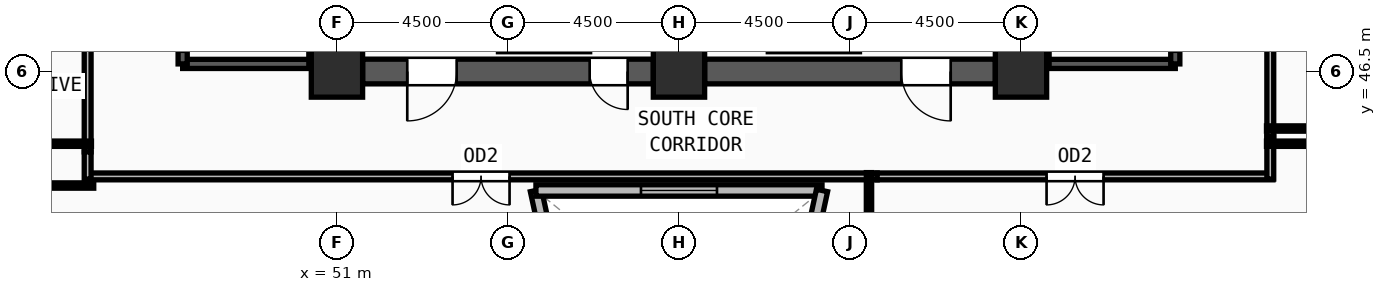
"""IFC4 building model, lengths in metres.
Left out: names, types, materials, properties, quantities, classifications, styles, units other than length and angle.
Written with IfcOpenShell. Run it as: python <this file> out.ifc"""

import sys

from ifc_helpers import new_model, si_unit, direction, frame, frame_2d, origin, origin_2d, place, context, subcontext, project, spatial, rectangle, extrude, source, transform, mapped, element, fill, save


model = new_model("IFC4")
c1 = context("Model", 3, precision=1e-05, world=origin(), true_north=direction((0.0, 1.0)))
c2 = subcontext(c1, "Body", "Model", "MODEL_VIEW")
j1 = project(units=[si_unit("LENGTHUNIT", "METRE"), si_unit("PLANEANGLEUNIT", "RADIAN")], contexts=[c1])
p1 = place(None, origin())
s1 = spatial("IfcSite", under=j1, at=p1, CompositionType="ELEMENT")
p2 = place(p1, origin())
s2 = spatial("IfcBuilding", under=s1, at=p2, CompositionType="ELEMENT")
p3 = place(p2, frame((0.0, 0.0, 224.25)))
s3 = spatial("IfcBuildingStorey", under=s2, at=p3, CompositionType="ELEMENT", Elevation=224.25)
m1 = source(origin(), c2, "Body", "SweptSolid", [
    extrude(rectangle(XDim=1.35, YDim=1.35, at=origin_2d()), origin(), (0.0, 0.0, 1.0), 3.75),
])
for number, where, z_axis, x_axis in (
    (1, (51.0, 46.5, 0.0), (0.0, 0.0, 1.0), (1.0, 0.0, 0.0)),
    (2, (60.0, 46.5, 0.0), (0.0, 0.0, 1.0), (1.0, 0.0, 0.0)),
    (3, (69.0, 46.5, 0.0), (0.0, 0.0, 1.0), (1.0, 0.0, 0.0)),
):
    element("IfcColumn", number, at=place(p3, frame(where, z_axis=z_axis, x_axis=x_axis)), inside=s3, PredefinedType="COLUMN", context=c2, shape_type="MappedRepresentation", body=[
        mapped(m1, transform((0.0, 0.0, 0.0), x_axis=(1.0, 0.0, 0.0), y_axis=(0.0, 1.0, 0.0), z_axis=(0.0, 0.0, 1.0), scale=1.0)),
    ])
p4 = place(p3, frame((38.205, 43.643, 0.0), z_axis=(0.0, 0.0, 1.0), x_axis=(0.553179293126, -0.83306222436, 0.0)))
e4 = element("IfcWall", 4, at=p4, inside=s3, PredefinedType="SOLIDWALL", context=c2, shape_type="SweptSolid", body=[
    extrude(rectangle(XDim=29.023, YDim=0.38, at=frame_2d((14.511, 0.0))), origin(), (0.0, 0.0, 1.0), 3.57),
])
m2 = source(origin(), c2, "Body", "SweptSolid", [
    extrude(rectangle(XDim=1.5, YDim=1.9, at=frame_2d((0.75, 0.95))), frame((0.0, 0.2, 0.0), z_axis=(0.0, -1.0, 0.0), x_axis=(1.0, 0.0, 0.0)), (0.0, 0.0, 1.0), 0.4),
])
p5 = place(p4, frame((6.506, 0.0, 0.55)))
e5 = element("IfcOpeningElement", 5, at=p5, cuts=e4, PredefinedType="OPENING", context=c2, shape_type="MappedRepresentation", body=[
    mapped(m2, transform((0.0, 0.0, 0.0), x_axis=(1.0, 0.0, 0.0), y_axis=(0.0, 1.0, 0.0), z_axis=(0.0, 0.0, 1.0), scale=1.0)),
])
p6 = place(p4, frame((13.762, 0.0, 0.55)))
e6 = element("IfcOpeningElement", 6, at=p6, cuts=e4, PredefinedType="OPENING", context=c2, shape_type="MappedRepresentation", body=[
    mapped(m2, transform((0.0, 0.0, 0.0), x_axis=(1.0, 0.0, 0.0), y_axis=(0.0, 1.0, 0.0), z_axis=(0.0, 0.0, 1.0), scale=1.0)),
])
p7 = place(p4, frame((21.017, 0.0, 0.55)))
e7 = element("IfcOpeningElement", 7, at=p7, cuts=e4, PredefinedType="OPENING", context=c2, shape_type="MappedRepresentation", body=[
    mapped(m2, transform((0.0, 0.0, 0.0), x_axis=(1.0, 0.0, 0.0), y_axis=(0.0, 1.0, 0.0), z_axis=(0.0, 0.0, 1.0), scale=1.0)),
])
p8 = place(p3, frame((68.325, 46.5, 0.0), z_axis=(0.0, 0.0, 1.0), x_axis=(-1.0, 0.0, 0.0)))
e8 = element("IfcWall", 8, at=p8, inside=s3, PredefinedType="SHEAR", context=c2, shape_type="SweptSolid", body=[
    extrude(rectangle(XDim=7.65, YDim=0.65, at=frame_2d((3.825, 0.0))), origin(), (0.0, 0.0, 1.0), 3.57),
])
m3 = source(origin(), c2, "Body", "SweptSolid", [
    extrude(rectangle(XDim=1.3, YDim=2.2, at=frame_2d((0.65, 1.1))), frame((0.0, 0.335, 0.0), z_axis=(0.0, -1.0, 0.0), x_axis=(1.0, 0.0, 0.0)), (0.0, 0.0, 1.0), 0.67),
])
p9 = place(p8, frame((1.175, 0.0, 0.0)))
e9 = element("IfcOpeningElement", 9, at=p9, cuts=e8, PredefinedType="OPENING", context=c2, shape_type="MappedRepresentation", body=[
    mapped(m3, transform((0.0, 0.0, 0.0), x_axis=(1.0, 0.0, 0.0), y_axis=(0.0, 1.0, 0.0), z_axis=(0.0, 0.0, 1.0), scale=1.0)),
])
p10 = place(p3, frame((59.325, 46.5, 0.0), z_axis=(0.0, 0.0, 1.0), x_axis=(-1.0, 0.0, 0.0)))
e10 = element("IfcWall", 10, at=p10, inside=s3, PredefinedType="SHEAR", context=c2, shape_type="SweptSolid", body=[
    extrude(rectangle(XDim=7.65, YDim=0.65, at=frame_2d((3.825, 0.0))), origin(), (0.0, 0.0, 1.0), 3.57),
])
p11 = place(p10, frame((5.175, 0.0, 0.0)))
e11 = element("IfcOpeningElement", 11, at=p11, cuts=e10, PredefinedType="OPENING", context=c2, shape_type="MappedRepresentation", body=[
    mapped(m3, transform((0.0, 0.0, 0.0), x_axis=(1.0, 0.0, 0.0), y_axis=(0.0, 1.0, 0.0), z_axis=(0.0, 0.0, 1.0), scale=1.0)),
])
m4 = source(origin(), c2, "Body", "SweptSolid", [
    extrude(rectangle(XDim=1.0, YDim=2.2, at=frame_2d((0.5, 1.1))), frame((0.0, 0.335, 0.0), z_axis=(0.0, -1.0, 0.0), x_axis=(1.0, 0.0, 0.0)), (0.0, 0.0, 1.0), 0.67),
])
p12 = place(p10, frame((0.675, 0.0, 0.0)))
e12 = element("IfcOpeningElement", 12, at=p12, cuts=e10, PredefinedType="OPENING", context=c2, shape_type="MappedRepresentation", body=[
    mapped(m4, transform((0.0, 0.0, 0.0), x_axis=(1.0, 0.0, 0.0), y_axis=(0.0, 1.0, 0.0), z_axis=(0.0, 0.0, 1.0), scale=1.0)),
])
p13 = place(p3, frame((46.94, 46.7, 0.0), z_axis=(0.0, 0.0, 1.0), x_axis=(1.0, 0.0, 0.0)))
e13 = element("IfcWall", 13, at=p13, inside=s3, PredefinedType="SOLIDWALL", context=c2, shape_type="SweptSolid", body=[
    extrude(rectangle(XDim=3.44, YDim=0.24, at=frame_2d((1.72, 0.0))), origin(), (0.0, 0.0, 1.0), 3.57),
])
p14 = place(p3, frame((50.38, 46.7, 0.0), z_axis=(0.0, 0.0, 1.0), x_axis=(0.0, 1.0, 0.0)))
e14 = element("IfcWall", 14, at=p14, inside=s3, PredefinedType="SOLIDWALL", context=c2, shape_type="SweptSolid", body=[
    extrude(rectangle(XDim=7.82, YDim=0.24, at=frame_2d((3.91, 0.0))), origin(), (0.0, 0.0, 1.0), 3.57),
])
p15 = place(p3, frame((46.94, 54.52, 0.0), z_axis=(0.0, 0.0, 1.0), x_axis=(0.0, -1.0, 0.0)))
e15 = element("IfcWall", 15, at=p15, inside=s3, PredefinedType="SOLIDWALL", context=c2, shape_type="SweptSolid", body=[
    extrude(rectangle(XDim=7.82, YDim=0.24, at=frame_2d((3.91, 0.0))), origin(), (0.0, 0.0, 1.0), 3.57),
])
m5 = source(origin(), c2, "Body", "SweptSolid", [
    extrude(rectangle(XDim=1.2, YDim=2.2, at=frame_2d((0.6, 1.1))), frame((0.0, 0.13, 0.0), z_axis=(0.0, -1.0, 0.0), x_axis=(1.0, 0.0, 0.0)), (0.0, 0.0, 1.0), 0.26),
])
p16 = place(p15, frame((6.3, 0.0, 0.0)))
e16 = element("IfcOpeningElement", 16, at=p16, cuts=e15, PredefinedType="OPENING", context=c2, shape_type="MappedRepresentation", body=[
    mapped(m5, transform((0.0, 0.0, 0.0), x_axis=(1.0, 0.0, 0.0), y_axis=(0.0, 1.0, 0.0), z_axis=(0.0, 0.0, 1.0), scale=1.0)),
])
p17 = place(p3, frame((69.62, 46.7, 0.0), z_axis=(0.0, 0.0, 1.0), x_axis=(1.0, 0.0, 0.0)))
e17 = element("IfcWall", 17, at=p17, inside=s3, PredefinedType="SOLIDWALL", context=c2, shape_type="SweptSolid", body=[
    extrude(rectangle(XDim=3.44, YDim=0.24, at=frame_2d((1.72, 0.0))), origin(), (0.0, 0.0, 1.0), 3.57),
])
p18 = place(p3, frame((73.06, 46.7, 0.0), z_axis=(0.0, 0.0, 1.0), x_axis=(0.0, 1.0, 0.0)))
e18 = element("IfcWall", 18, at=p18, inside=s3, PredefinedType="SOLIDWALL", context=c2, shape_type="SweptSolid", body=[
    extrude(rectangle(XDim=7.82, YDim=0.24, at=frame_2d((3.91, 0.0))), origin(), (0.0, 0.0, 1.0), 3.57),
])
p19 = place(p18, frame((0.32, 0.0, 0.0)))
e19 = element("IfcOpeningElement", 19, at=p19, cuts=e18, PredefinedType="OPENING", context=c2, shape_type="MappedRepresentation", body=[
    mapped(m5, transform((0.0, 0.0, 0.0), x_axis=(1.0, 0.0, 0.0), y_axis=(0.0, 1.0, 0.0), z_axis=(0.0, 0.0, 1.0), scale=1.0)),
])
p20 = place(p3, frame((69.62, 54.52, 0.0), z_axis=(0.0, 0.0, 1.0), x_axis=(0.0, -1.0, 0.0)))
e20 = element("IfcWall", 20, at=p20, inside=s3, PredefinedType="SOLIDWALL", context=c2, shape_type="SweptSolid", body=[
    extrude(rectangle(XDim=7.82, YDim=0.24, at=frame_2d((3.91, 0.0))), origin(), (0.0, 0.0, 1.0), 3.57),
])
p21 = place(p3, frame((57.554, 37.277, 0.0), z_axis=(0.0, 0.0, 1.0), x_axis=(-0.211403575635, 0.977398858301, 0.0)))
e21 = element("IfcWall", 21, at=p21, inside=s3, PredefinedType="SOLIDWALL", context=c2, shape_type="SweptSolid", body=[
    extrude(rectangle(XDim=6.234, YDim=0.3, at=frame_2d((3.117, 0.0))), origin(), (0.0, 0.0, 1.0), 3.57),
])
m6 = source(origin(), c2, "Body", "SweptSolid", [
    extrude(rectangle(XDim=2.0, YDim=1.9, at=frame_2d((1.0, 0.95))), frame((0.0, 0.16, 0.0), z_axis=(0.0, -1.0, 0.0), x_axis=(1.0, 0.0, 0.0)), (0.0, 0.0, 1.0), 0.32),
])
p22 = place(p21, frame((2.117, 0.0, 0.55)))
e22 = element("IfcOpeningElement", 22, at=p22, cuts=e21, PredefinedType="OPENING", context=c2, shape_type="MappedRepresentation", body=[
    mapped(m6, transform((0.0, 0.0, 0.0), x_axis=(1.0, 0.0, 0.0), y_axis=(0.0, 1.0, 0.0), z_axis=(0.0, 0.0, 1.0), scale=1.0)),
])
p23 = place(p3, frame((56.236, 43.37, 0.0), z_axis=(0.0, 0.0, 1.0), x_axis=(1.0, 0.0, 0.0)))
e23 = element("IfcWall", 23, at=p23, inside=s3, PredefinedType="SOLIDWALL", context=c2, shape_type="SweptSolid", body=[
    extrude(rectangle(XDim=7.528, YDim=0.3, at=frame_2d((3.764, 0.0))), origin(), (0.0, 0.0, 1.0), 3.57),
])
p24 = place(p23, frame((2.764, 0.0, 0.55)))
e24 = element("IfcOpeningElement", 24, at=p24, cuts=e23, PredefinedType="OPENING", context=c2, shape_type="MappedRepresentation", body=[
    mapped(m6, transform((0.0, 0.0, 0.0), x_axis=(1.0, 0.0, 0.0), y_axis=(0.0, 1.0, 0.0), z_axis=(0.0, 0.0, 1.0), scale=1.0)),
])
p25 = place(p3, frame((63.764, 43.37, 0.0), z_axis=(0.0, 0.0, 1.0), x_axis=(-0.211403575635, -0.977398858301, 0.0)))
e25 = element("IfcWall", 25, at=p25, inside=s3, PredefinedType="SOLIDWALL", context=c2, shape_type="SweptSolid", body=[
    extrude(rectangle(XDim=6.234, YDim=0.3, at=frame_2d((3.117, 0.0))), origin(), (0.0, 0.0, 1.0), 3.57),
])
p26 = place(p25, frame((2.117, 0.0, 0.55)))
e26 = element("IfcOpeningElement", 26, at=p26, cuts=e25, PredefinedType="OPENING", context=c2, shape_type="MappedRepresentation", body=[
    mapped(m6, transform((0.0, 0.0, 0.0), x_axis=(1.0, 0.0, 0.0), y_axis=(0.0, 1.0, 0.0), z_axis=(0.0, 0.0, 1.0), scale=1.0)),
])
p27 = place(p3, frame((65.215, 43.74, 0.0), z_axis=(0.0, 0.0, 1.0), x_axis=(-1.0, 0.0, 0.0)))
e27 = element("IfcWall", 27, at=p27, inside=s3, PredefinedType="PARTITIONING", context=c2, shape_type="SweptSolid", body=[
    extrude(rectangle(XDim=20.845, YDim=0.18, at=frame_2d((10.422, 0.0))), origin(), (0.0, 0.0, 1.0), 3.57),
])
m7 = source(origin(), c2, "Body", "SweptSolid", [
    extrude(rectangle(XDim=1.5, YDim=2.2, at=frame_2d((0.75, 1.1))), frame((0.0, 0.1, 0.0), z_axis=(0.0, -1.0, 0.0), x_axis=(1.0, 0.0, 0.0)), (0.0, 0.0, 1.0), 0.2),
])
p28 = place(p27, frame((9.673, 0.0, 0.0)))
e28 = element("IfcOpeningElement", 28, at=p28, cuts=e27, PredefinedType="OPENING", context=c2, shape_type="MappedRepresentation", body=[
    mapped(m7, transform((0.0, 0.0, 0.0), x_axis=(1.0, 0.0, 0.0), y_axis=(0.0, 1.0, 0.0), z_axis=(0.0, 0.0, 1.0), scale=1.0)),
])
p29 = place(p3, frame((75.63, 43.74, 0.0), z_axis=(0.0, 0.0, 1.0), x_axis=(-1.0, 0.0, 0.0)))
e29 = element("IfcWall", 29, at=p29, inside=s3, PredefinedType="PARTITIONING", context=c2, shape_type="SweptSolid", body=[
    extrude(rectangle(XDim=10.415, YDim=0.18, at=frame_2d((5.208, 0.0))), origin(), (0.0, 0.0, 1.0), 3.57),
])
p30 = place(p29, frame((4.457, 0.0, 0.0)))
e30 = element("IfcOpeningElement", 30, at=p30, cuts=e29, PredefinedType="OPENING", context=c2, shape_type="MappedRepresentation", body=[
    mapped(m7, transform((0.0, 0.0, 0.0), x_axis=(1.0, 0.0, 0.0), y_axis=(0.0, 1.0, 0.0), z_axis=(0.0, 0.0, 1.0), scale=1.0)),
])
p31 = place(p3, frame((75.56, 51.285, 0.0), z_axis=(0.0, 0.0, 1.0), x_axis=(0.0, -1.0, 0.0)))
e31 = element("IfcWall", 31, at=p31, inside=s3, PredefinedType="PARTITIONING", context=c2, shape_type="SweptSolid", body=[
    extrude(rectangle(XDim=6.5, YDim=0.18, at=frame_2d((3.25, 0.0))), origin(), (0.0, 0.0, 1.0), 3.57),
])
m8 = source(origin(), c2, "Body", "SweptSolid", [
    extrude(rectangle(XDim=1.0, YDim=2.2, at=frame_2d((0.5, 1.1))), frame((0.0, 0.1, 0.0), z_axis=(0.0, -1.0, 0.0), x_axis=(1.0, 0.0, 0.0)), (0.0, 0.0, 1.0), 0.2),
])
p32 = place(p31, frame((2.75, 0.0, 0.0)))
e32 = element("IfcOpeningElement", 32, at=p32, cuts=e31, PredefinedType="OPENING", context=c2, shape_type="MappedRepresentation", body=[
    mapped(m8, transform((0.0, 0.0, 0.0), x_axis=(1.0, 0.0, 0.0), y_axis=(0.0, 1.0, 0.0), z_axis=(0.0, 0.0, 1.0), scale=1.0)),
])
p33 = place(p3, frame((44.44, 44.385, 0.0), z_axis=(0.0, 0.0, 1.0), x_axis=(0.0, 1.0, 0.0)))
e33 = element("IfcWall", 33, at=p33, inside=s3, PredefinedType="PARTITIONING", context=c2, shape_type="SweptSolid", body=[
    extrude(rectangle(XDim=3.825, YDim=0.18, at=frame_2d((1.913, 0.0))), origin(), (0.0, 0.0, 1.0), 3.57),
])
p34 = place(p3, frame((44.44, 43.67, 0.0), z_axis=(0.0, 0.0, 1.0), x_axis=(0.0, 1.0, 0.0)))
e34 = element("IfcWall", 34, at=p34, inside=s3, PredefinedType="PARTITIONING", context=c2, shape_type="SweptSolid", body=[
    extrude(rectangle(XDim=0.715, YDim=0.18, at=frame_2d((0.357, 0.0))), origin(), (0.0, 0.0, 1.0), 3.57),
])
p35 = place(p3, frame((75.56, 44.785, 0.0), z_axis=(0.0, 0.0, 1.0), x_axis=(0.0, -1.0, 0.0)))
e35 = element("IfcWall", 35, at=p35, inside=s3, PredefinedType="PARTITIONING", context=c2, shape_type="SweptSolid", body=[
    extrude(rectangle(XDim=1.115, YDim=0.18, at=frame_2d((0.558, 0.0))), origin(), (0.0, 0.0, 1.0), 3.57),
])
p36 = place(p3, frame((44.6, 43.5, 0.0), z_axis=(0.0, 0.0, 1.0), x_axis=(-1.0, 0.0, 0.0)))
e36 = element("IfcWall", 36, at=p36, inside=s3, PredefinedType="PARTITIONING", context=c2, shape_type="SweptSolid", body=[
    extrude(rectangle(XDim=7.056, YDim=0.14, at=frame_2d((3.528, 0.0))), origin(), (0.0, 0.0, 1.0), 3.57),
])
p37 = place(p3, frame((44.54, 44.6, 0.0), z_axis=(0.0, 0.0, 1.0), x_axis=(-1.0, 0.0, 0.0)))
e37 = element("IfcWall", 37, at=p37, inside=s3, PredefinedType="PARTITIONING", context=c2, shape_type="SweptSolid", body=[
    extrude(rectangle(XDim=7.588, YDim=0.14, at=frame_2d((3.794, 0.0))), origin(), (0.0, 0.0, 1.0), 3.57),
])
p38 = place(p3, frame((75.46, 44.6, 0.0), z_axis=(0.0, 0.0, 1.0), x_axis=(1.0, 0.0, 0.0)))
e38 = element("IfcWall", 38, at=p38, inside=s3, PredefinedType="PARTITIONING", context=c2, shape_type="SweptSolid", body=[
    extrude(rectangle(XDim=7.244, YDim=0.14, at=frame_2d((3.622, 0.0))), origin(), (0.0, 0.0, 1.0), 3.57),
])
p39 = place(p3, frame((75.46, 45.0, 0.0), z_axis=(0.0, 0.0, 1.0), x_axis=(1.0, 0.0, 0.0)))
e39 = element("IfcWall", 39, at=p39, inside=s3, PredefinedType="PARTITIONING", context=c2, shape_type="SweptSolid", body=[
    extrude(rectangle(XDim=7.442, YDim=0.14, at=frame_2d((3.721, 0.0))), origin(), (0.0, 0.0, 1.0), 3.57),
])
p40 = place(p3, frame((65.0, 43.84, 0.0), z_axis=(0.0, 0.0, 1.0), x_axis=(0.0, -1.0, 0.0)))
e40 = element("IfcWall", 40, at=p40, inside=s3, PredefinedType="PARTITIONING", context=c2, shape_type="SweptSolid", body=[
    extrude(rectangle(XDim=25.438, YDim=0.14, at=frame_2d((12.719, 0.0))), origin(), (0.0, 0.0, 1.0), 3.57),
])
m9 = source(origin(), c2, "Body", "SweptSolid", [
    extrude(rectangle(XDim=1.3, YDim=2.2, at=frame_2d((0.65, 1.1))), frame((0.0, 0.025, 0.0), z_axis=(0.0, -1.0, 0.0), x_axis=(1.0, 0.0, 0.0)), (0.0, 0.0, 1.0), 0.05),
])
p41 = place(p11, origin())
e41 = element("IfcDoor", 41, at=p41, inside=s3, OperationType="SINGLE_SWING_RIGHT", PredefinedType="DOOR", context=c2, shape_type="MappedRepresentation", body=[
    mapped(m9, transform((0.0, 0.0, 0.0), x_axis=(1.0, 0.0, 0.0), y_axis=(0.0, 1.0, 0.0), z_axis=(0.0, 0.0, 1.0), scale=1.0)),
])
fill(e11, e41)
m10 = source(origin(), c2, "Body", "SweptSolid", [
    extrude(rectangle(XDim=1.0, YDim=2.2, at=frame_2d((0.5, 1.1))), frame((0.0, 0.025, 0.0), z_axis=(0.0, -1.0, 0.0), x_axis=(1.0, 0.0, 0.0)), (0.0, 0.0, 1.0), 0.05),
])
p42 = place(p12, origin())
e42 = element("IfcDoor", 42, at=p42, inside=s3, OperationType="SINGLE_SWING_LEFT", PredefinedType="DOOR", context=c2, shape_type="MappedRepresentation", body=[
    mapped(m10, transform((0.0, 0.0, 0.0), x_axis=(1.0, 0.0, 0.0), y_axis=(0.0, 1.0, 0.0), z_axis=(0.0, 0.0, 1.0), scale=1.0)),
])
fill(e12, e42)
p43 = place(p9, origin())
e43 = element("IfcDoor", 43, at=p43, inside=s3, OperationType="SINGLE_SWING_LEFT", PredefinedType="DOOR", context=c2, shape_type="MappedRepresentation", body=[
    mapped(m9, transform((0.0, 0.0, 0.0), x_axis=(1.0, 0.0, 0.0), y_axis=(0.0, 1.0, 0.0), z_axis=(0.0, 0.0, 1.0), scale=1.0)),
])
fill(e9, e43)
m11 = source(origin(), c2, "Body", "SweptSolid", [
    extrude(rectangle(XDim=2.0, YDim=1.9, at=frame_2d((1.0, 0.95))), frame((0.0, 0.03, 0.0), z_axis=(0.0, -1.0, 0.0), x_axis=(1.0, 0.0, 0.0)), (0.0, 0.0, 1.0), 0.06),
])
p44 = place(p24, origin())
e44 = element("IfcWindow", 44, at=p44, inside=s3, PartitioningType="DOUBLE_PANEL_VERTICAL", PredefinedType="WINDOW", context=c2, shape_type="MappedRepresentation", body=[
    mapped(m11, transform((0.0, 0.0, 0.0), x_axis=(1.0, 0.0, 0.0), y_axis=(0.0, 1.0, 0.0), z_axis=(0.0, 0.0, 1.0), scale=1.0)),
])
fill(e24, e44)
m12 = source(origin(), c2, "Body", "SweptSolid", [
    extrude(rectangle(XDim=1.5, YDim=2.2, at=frame_2d((0.75, 1.1))), frame((0.0, 0.025, 0.0), z_axis=(0.0, -1.0, 0.0), x_axis=(1.0, 0.0, 0.0)), (0.0, 0.0, 1.0), 0.05),
])
p45 = place(p28, origin())
e45 = element("IfcDoor", 45, at=p45, inside=s3, OperationType="DOUBLE_DOOR_SINGLE_SWING", PredefinedType="DOOR", context=c2, shape_type="MappedRepresentation", body=[
    mapped(m12, transform((0.0, 0.0, 0.0), x_axis=(1.0, 0.0, 0.0), y_axis=(0.0, 1.0, 0.0), z_axis=(0.0, 0.0, 1.0), scale=1.0)),
])
fill(e28, e45)
p46 = place(p30, origin())
e46 = element("IfcDoor", 46, at=p46, inside=s3, OperationType="DOUBLE_DOOR_SINGLE_SWING", PredefinedType="DOOR", context=c2, shape_type="MappedRepresentation", body=[
    mapped(m12, transform((0.0, 0.0, 0.0), x_axis=(1.0, 0.0, 0.0), y_axis=(0.0, 1.0, 0.0), z_axis=(0.0, 0.0, 1.0), scale=1.0)),
])
fill(e30, e46)
save(model, sys.argv[1])
